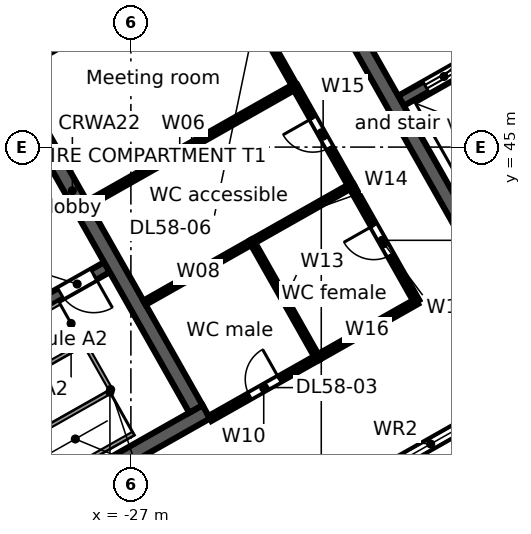
"""IFC4 building model, lengths in metres.
Left out: names, types, materials, properties, quantities, classifications, styles, units other than length and angle.
Written with IfcOpenShell. Run it as: python <this file> out.ifc"""

import sys

from ifc_helpers import new_model, si_unit, direction, frame, frame_2d, origin, place, context, subcontext, project, spatial, rectangle, extrude, element, fill, save


model = new_model("IFC4")
c1 = context("Model", 3, precision=1e-05, world=origin(), true_north=direction((0.0, 1.0)))
c2 = subcontext(c1, "Body", "Model", "MODEL_VIEW")
j1 = project(units=[si_unit("LENGTHUNIT", "METRE"), si_unit("PLANEANGLEUNIT", "RADIAN")], contexts=[c1])
p1 = place(None, origin())
s1 = spatial("IfcSite", under=j1, at=p1, CompositionType="ELEMENT")
p2 = place(p1, origin())
s2 = spatial("IfcBuilding", under=s1, at=p2, CompositionType="ELEMENT")
p3 = place(p2, frame((0.0, 0.0, 266.5)))
s3 = spatial("IfcBuildingStorey", under=s2, at=p3, CompositionType="ELEMENT", Elevation=266.5)
p4 = place(p3, frame((-58.732, 38.771, 0.0), z_axis=(0.0, 0.0, 1.0), x_axis=(0.870355615581, 0.492423702137, 0.0)))
e1 = element("IfcWall", 1, at=p4, inside=s3, PredefinedType="STANDARD", context=c2, shape_type="SweptSolid", body=[
    extrude(rectangle(XDim=64.052, YDim=0.25, at=frame_2d((32.026, 0.0))), origin(), (0.0, 0.0, 1.0), 3.52),
])
p5 = place(p4, frame((61.259, 0.0, 0.8)))
e2 = element("IfcOpeningElement", 2, at=p5, cuts=e1, PredefinedType="OPENING", context=c2, shape_type="SweptSolid", body=[
    extrude(rectangle(XDim=2.4, YDim=2.2, at=frame_2d((1.2, 1.1))), frame((0.0, 0.135, 0.0), z_axis=(0.0, -1.0, 0.0), x_axis=(1.0, 0.0, 0.0)), (0.0, 0.0, 1.0), 0.27),
])
p6 = place(p4, frame((58.216, 0.0, 0.8)))
e3 = element("IfcOpeningElement", 3, at=p6, cuts=e1, PredefinedType="OPENING", context=c2, shape_type="SweptSolid", body=[
    extrude(rectangle(XDim=2.4, YDim=2.2, at=frame_2d((1.2, 1.1))), frame((0.0, 0.135, 0.0), z_axis=(0.0, -1.0, 0.0), x_axis=(1.0, 0.0, 0.0)), (0.0, 0.0, 1.0), 0.27),
])
p7 = place(p4, frame((55.173, 0.0, 0.8)))
e4 = element("IfcOpeningElement", 4, at=p7, cuts=e1, PredefinedType="OPENING", context=c2, shape_type="SweptSolid", body=[
    extrude(rectangle(XDim=2.4, YDim=2.2, at=frame_2d((1.2, 1.1))), frame((0.0, 0.135, 0.0), z_axis=(0.0, -1.0, 0.0), x_axis=(1.0, 0.0, 0.0)), (0.0, 0.0, 1.0), 0.27),
])
p8 = place(p4, frame((52.129, 0.0, 0.8)))
e5 = element("IfcOpeningElement", 5, at=p8, cuts=e1, PredefinedType="OPENING", context=c2, shape_type="SweptSolid", body=[
    extrude(rectangle(XDim=2.4, YDim=2.2, at=frame_2d((1.2, 1.1))), frame((0.0, 0.135, 0.0), z_axis=(0.0, -1.0, 0.0), x_axis=(1.0, 0.0, 0.0)), (0.0, 0.0, 1.0), 0.27),
])
p9 = place(p4, frame((49.086, 0.0, 0.8)))
e6 = element("IfcOpeningElement", 6, at=p9, cuts=e1, PredefinedType="OPENING", context=c2, shape_type="SweptSolid", body=[
    extrude(rectangle(XDim=2.4, YDim=2.2, at=frame_2d((1.2, 1.1))), frame((0.0, 0.135, 0.0), z_axis=(0.0, -1.0, 0.0), x_axis=(1.0, 0.0, 0.0)), (0.0, 0.0, 1.0), 0.27),
])
p10 = place(p4, frame((46.043, 0.0, 0.8)))
e7 = element("IfcOpeningElement", 7, at=p10, cuts=e1, PredefinedType="OPENING", context=c2, shape_type="SweptSolid", body=[
    extrude(rectangle(XDim=2.4, YDim=2.2, at=frame_2d((1.2, 1.1))), frame((0.0, 0.135, 0.0), z_axis=(0.0, -1.0, 0.0), x_axis=(1.0, 0.0, 0.0)), (0.0, 0.0, 1.0), 0.27),
])
p11 = place(p4, frame((43.0, 0.0, 0.8)))
e8 = element("IfcOpeningElement", 8, at=p11, cuts=e1, PredefinedType="OPENING", context=c2, shape_type="SweptSolid", body=[
    extrude(rectangle(XDim=2.4, YDim=2.2, at=frame_2d((1.2, 1.1))), frame((0.0, 0.135, 0.0), z_axis=(0.0, -1.0, 0.0), x_axis=(1.0, 0.0, 0.0)), (0.0, 0.0, 1.0), 0.27),
])
p12 = place(p4, frame((39.956, 0.0, 0.8)))
e9 = element("IfcOpeningElement", 9, at=p12, cuts=e1, PredefinedType="OPENING", context=c2, shape_type="SweptSolid", body=[
    extrude(rectangle(XDim=2.4, YDim=2.2, at=frame_2d((1.2, 1.1))), frame((0.0, 0.135, 0.0), z_axis=(0.0, -1.0, 0.0), x_axis=(1.0, 0.0, 0.0)), (0.0, 0.0, 1.0), 0.27),
])
p13 = place(p4, frame((36.913, 0.0, 0.8)))
e10 = element("IfcOpeningElement", 10, at=p13, cuts=e1, PredefinedType="OPENING", context=c2, shape_type="SweptSolid", body=[
    extrude(rectangle(XDim=2.4, YDim=2.2, at=frame_2d((1.2, 1.1))), frame((0.0, 0.135, 0.0), z_axis=(0.0, -1.0, 0.0), x_axis=(1.0, 0.0, 0.0)), (0.0, 0.0, 1.0), 0.27),
])
p14 = place(p4, frame((33.87, 0.0, 0.8)))
e11 = element("IfcOpeningElement", 11, at=p14, cuts=e1, PredefinedType="OPENING", context=c2, shape_type="SweptSolid", body=[
    extrude(rectangle(XDim=2.4, YDim=2.2, at=frame_2d((1.2, 1.1))), frame((0.0, 0.135, 0.0), z_axis=(0.0, -1.0, 0.0), x_axis=(1.0, 0.0, 0.0)), (0.0, 0.0, 1.0), 0.27),
])
p15 = place(p4, frame((30.826, 0.0, 0.8)))
e12 = element("IfcOpeningElement", 12, at=p15, cuts=e1, PredefinedType="OPENING", context=c2, shape_type="SweptSolid", body=[
    extrude(rectangle(XDim=2.4, YDim=2.2, at=frame_2d((1.2, 1.1))), frame((0.0, 0.135, 0.0), z_axis=(0.0, -1.0, 0.0), x_axis=(1.0, 0.0, 0.0)), (0.0, 0.0, 1.0), 0.27),
])
p16 = place(p4, frame((27.783, 0.0, 0.8)))
e13 = element("IfcOpeningElement", 13, at=p16, cuts=e1, PredefinedType="OPENING", context=c2, shape_type="SweptSolid", body=[
    extrude(rectangle(XDim=2.4, YDim=2.2, at=frame_2d((1.2, 1.1))), frame((0.0, 0.135, 0.0), z_axis=(0.0, -1.0, 0.0), x_axis=(1.0, 0.0, 0.0)), (0.0, 0.0, 1.0), 0.27),
])
p17 = place(p4, frame((24.74, 0.0, 0.8)))
e14 = element("IfcOpeningElement", 14, at=p17, cuts=e1, PredefinedType="OPENING", context=c2, shape_type="SweptSolid", body=[
    extrude(rectangle(XDim=2.4, YDim=2.2, at=frame_2d((1.2, 1.1))), frame((0.0, 0.135, 0.0), z_axis=(0.0, -1.0, 0.0), x_axis=(1.0, 0.0, 0.0)), (0.0, 0.0, 1.0), 0.27),
])
p18 = place(p4, frame((21.696, 0.0, 0.8)))
e15 = element("IfcOpeningElement", 15, at=p18, cuts=e1, PredefinedType="OPENING", context=c2, shape_type="SweptSolid", body=[
    extrude(rectangle(XDim=2.4, YDim=2.2, at=frame_2d((1.2, 1.1))), frame((0.0, 0.135, 0.0), z_axis=(0.0, -1.0, 0.0), x_axis=(1.0, 0.0, 0.0)), (0.0, 0.0, 1.0), 0.27),
])
p19 = place(p4, frame((18.653, 0.0, 0.8)))
e16 = element("IfcOpeningElement", 16, at=p19, cuts=e1, PredefinedType="OPENING", context=c2, shape_type="SweptSolid", body=[
    extrude(rectangle(XDim=2.4, YDim=2.2, at=frame_2d((1.2, 1.1))), frame((0.0, 0.135, 0.0), z_axis=(0.0, -1.0, 0.0), x_axis=(1.0, 0.0, 0.0)), (0.0, 0.0, 1.0), 0.27),
])
p20 = place(p4, frame((15.61, 0.0, 0.8)))
e17 = element("IfcOpeningElement", 17, at=p20, cuts=e1, PredefinedType="OPENING", context=c2, shape_type="SweptSolid", body=[
    extrude(rectangle(XDim=2.4, YDim=2.2, at=frame_2d((1.2, 1.1))), frame((0.0, 0.135, 0.0), z_axis=(0.0, -1.0, 0.0), x_axis=(1.0, 0.0, 0.0)), (0.0, 0.0, 1.0), 0.27),
])
p21 = place(p4, frame((12.567, 0.0, 0.8)))
e18 = element("IfcOpeningElement", 18, at=p21, cuts=e1, PredefinedType="OPENING", context=c2, shape_type="SweptSolid", body=[
    extrude(rectangle(XDim=2.4, YDim=2.2, at=frame_2d((1.2, 1.1))), frame((0.0, 0.135, 0.0), z_axis=(0.0, -1.0, 0.0), x_axis=(1.0, 0.0, 0.0)), (0.0, 0.0, 1.0), 0.27),
])
p22 = place(p4, frame((9.523, 0.0, 0.8)))
e19 = element("IfcOpeningElement", 19, at=p22, cuts=e1, PredefinedType="OPENING", context=c2, shape_type="SweptSolid", body=[
    extrude(rectangle(XDim=2.4, YDim=2.2, at=frame_2d((1.2, 1.1))), frame((0.0, 0.135, 0.0), z_axis=(0.0, -1.0, 0.0), x_axis=(1.0, 0.0, 0.0)), (0.0, 0.0, 1.0), 0.27),
])
p23 = place(p4, frame((6.48, 0.0, 0.8)))
e20 = element("IfcOpeningElement", 20, at=p23, cuts=e1, PredefinedType="OPENING", context=c2, shape_type="SweptSolid", body=[
    extrude(rectangle(XDim=2.4, YDim=2.2, at=frame_2d((1.2, 1.1))), frame((0.0, 0.135, 0.0), z_axis=(0.0, -1.0, 0.0), x_axis=(1.0, 0.0, 0.0)), (0.0, 0.0, 1.0), 0.27),
])
p24 = place(p4, frame((3.437, 0.0, 0.8)))
e21 = element("IfcOpeningElement", 21, at=p24, cuts=e1, PredefinedType="OPENING", context=c2, shape_type="SweptSolid", body=[
    extrude(rectangle(XDim=2.4, YDim=2.2, at=frame_2d((1.2, 1.1))), frame((0.0, 0.135, 0.0), z_axis=(0.0, -1.0, 0.0), x_axis=(1.0, 0.0, 0.0)), (0.0, 0.0, 1.0), 0.27),
])
p25 = place(p4, frame((0.393, 0.0, 0.8)))
e22 = element("IfcOpeningElement", 22, at=p25, cuts=e1, PredefinedType="OPENING", context=c2, shape_type="SweptSolid", body=[
    extrude(rectangle(XDim=2.4, YDim=2.2, at=frame_2d((1.2, 1.1))), frame((0.0, 0.135, 0.0), z_axis=(0.0, -1.0, 0.0), x_axis=(1.0, 0.0, 0.0)), (0.0, 0.0, 1.0), 0.27),
])
p26 = place(p3, frame((-3.017, 46.293, 0.0), z_axis=(0.0, 0.0, 1.0), x_axis=(-0.870355474887, -0.492423950812, 0.0)))
e23 = element("IfcWall", 23, at=p26, inside=s3, PredefinedType="STANDARD", context=c2, shape_type="SweptSolid", body=[
    extrude(rectangle(XDim=40.34, YDim=0.25, at=frame_2d((20.17, 0.0))), origin(), (0.0, 0.0, 1.0), 3.52),
])
p27 = place(p26, frame((37.428, 0.0, 0.8)))
e24 = element("IfcOpeningElement", 24, at=p27, cuts=e23, PredefinedType="OPENING", context=c2, shape_type="SweptSolid", body=[
    extrude(rectangle(XDim=2.4, YDim=2.2, at=frame_2d((1.2, 1.1))), frame((0.0, 0.135, 0.0), z_axis=(0.0, -1.0, 0.0), x_axis=(1.0, 0.0, 0.0)), (0.0, 0.0, 1.0), 0.27),
])
p28 = place(p26, frame((34.372, 0.0, 0.0)))
e25 = element("IfcOpeningElement", 25, at=p28, cuts=e23, PredefinedType="OPENING", context=c2, shape_type="SweptSolid", body=[
    extrude(rectangle(XDim=1.8, YDim=2.4, at=frame_2d((0.9, 1.2))), frame((0.0, 0.135, 0.0), z_axis=(0.0, -1.0, 0.0), x_axis=(1.0, 0.0, 0.0)), (0.0, 0.0, 1.0), 0.27),
])
p29 = place(p26, frame((30.716, 0.0, 0.8)))
e26 = element("IfcOpeningElement", 26, at=p29, cuts=e23, PredefinedType="OPENING", context=c2, shape_type="SweptSolid", body=[
    extrude(rectangle(XDim=2.4, YDim=2.2, at=frame_2d((1.2, 1.1))), frame((0.0, 0.135, 0.0), z_axis=(0.0, -1.0, 0.0), x_axis=(1.0, 0.0, 0.0)), (0.0, 0.0, 1.0), 0.27),
])
p30 = place(p26, frame((27.36, 0.0, 0.8)))
e27 = element("IfcOpeningElement", 27, at=p30, cuts=e23, PredefinedType="OPENING", context=c2, shape_type="SweptSolid", body=[
    extrude(rectangle(XDim=2.4, YDim=2.2, at=frame_2d((1.2, 1.1))), frame((0.0, 0.135, 0.0), z_axis=(0.0, -1.0, 0.0), x_axis=(1.0, 0.0, 0.0)), (0.0, 0.0, 1.0), 0.27),
])
p31 = place(p26, frame((24.304, 0.0, 0.0)))
e28 = element("IfcOpeningElement", 28, at=p31, cuts=e23, PredefinedType="OPENING", context=c2, shape_type="SweptSolid", body=[
    extrude(rectangle(XDim=1.8, YDim=2.4, at=frame_2d((0.9, 1.2))), frame((0.0, 0.135, 0.0), z_axis=(0.0, -1.0, 0.0), x_axis=(1.0, 0.0, 0.0)), (0.0, 0.0, 1.0), 0.27),
])
p32 = place(p26, frame((20.648, 0.0, 0.8)))
e29 = element("IfcOpeningElement", 29, at=p32, cuts=e23, PredefinedType="OPENING", context=c2, shape_type="SweptSolid", body=[
    extrude(rectangle(XDim=2.4, YDim=2.2, at=frame_2d((1.2, 1.1))), frame((0.0, 0.135, 0.0), z_axis=(0.0, -1.0, 0.0), x_axis=(1.0, 0.0, 0.0)), (0.0, 0.0, 1.0), 0.27),
])
p33 = place(p26, frame((17.292, 0.0, 0.8)))
e30 = element("IfcOpeningElement", 30, at=p33, cuts=e23, PredefinedType="OPENING", context=c2, shape_type="SweptSolid", body=[
    extrude(rectangle(XDim=2.4, YDim=2.2, at=frame_2d((1.2, 1.1))), frame((0.0, 0.135, 0.0), z_axis=(0.0, -1.0, 0.0), x_axis=(1.0, 0.0, 0.0)), (0.0, 0.0, 1.0), 0.27),
])
p34 = place(p26, frame((14.236, 0.0, 0.0)))
e31 = element("IfcOpeningElement", 31, at=p34, cuts=e23, PredefinedType="OPENING", context=c2, shape_type="SweptSolid", body=[
    extrude(rectangle(XDim=1.8, YDim=2.4, at=frame_2d((0.9, 1.2))), frame((0.0, 0.135, 0.0), z_axis=(0.0, -1.0, 0.0), x_axis=(1.0, 0.0, 0.0)), (0.0, 0.0, 1.0), 0.27),
])
p35 = place(p26, frame((10.58, 0.0, 0.8)))
e32 = element("IfcOpeningElement", 32, at=p35, cuts=e23, PredefinedType="OPENING", context=c2, shape_type="SweptSolid", body=[
    extrude(rectangle(XDim=2.4, YDim=2.2, at=frame_2d((1.2, 1.1))), frame((0.0, 0.135, 0.0), z_axis=(0.0, -1.0, 0.0), x_axis=(1.0, 0.0, 0.0)), (0.0, 0.0, 1.0), 0.27),
])
p36 = place(p26, frame((7.224, 0.0, 0.8)))
e33 = element("IfcOpeningElement", 33, at=p36, cuts=e23, PredefinedType="OPENING", context=c2, shape_type="SweptSolid", body=[
    extrude(rectangle(XDim=2.4, YDim=2.2, at=frame_2d((1.2, 1.1))), frame((0.0, 0.135, 0.0), z_axis=(0.0, -1.0, 0.0), x_axis=(1.0, 0.0, 0.0)), (0.0, 0.0, 1.0), 0.27),
])
p37 = place(p26, frame((4.168, 0.0, 0.0)))
e34 = element("IfcOpeningElement", 34, at=p37, cuts=e23, PredefinedType="OPENING", context=c2, shape_type="SweptSolid", body=[
    extrude(rectangle(XDim=1.8, YDim=2.4, at=frame_2d((0.9, 1.2))), frame((0.0, 0.135, 0.0), z_axis=(0.0, -1.0, 0.0), x_axis=(1.0, 0.0, 0.0)), (0.0, 0.0, 1.0), 0.27),
])
p38 = place(p26, frame((0.512, 0.0, 0.8)))
e35 = element("IfcOpeningElement", 35, at=p38, cuts=e23, PredefinedType="OPENING", context=c2, shape_type="SweptSolid", body=[
    extrude(rectangle(XDim=2.4, YDim=2.2, at=frame_2d((1.2, 1.1))), frame((0.0, 0.135, 0.0), z_axis=(0.0, -1.0, 0.0), x_axis=(1.0, 0.0, 0.0)), (0.0, 0.0, 1.0), 0.27),
])
p39 = place(p3, frame((-39.813, 29.662, 0.0), z_axis=(0.0, 0.0, 1.0), x_axis=(0.870350116061, 0.492433422375, 0.0)))
e36 = element("IfcWall", 36, at=p39, inside=s3, PredefinedType="SOLIDWALL", context=c2, shape_type="SweptSolid", body=[
    extrude(rectangle(XDim=17.0, YDim=0.4, at=frame_2d((8.5, 0.0))), origin(), (0.0, 0.0, 1.0), 3.52),
])
p40 = place(p39, frame((7.2, 0.0, 0.0)))
e37 = element("IfcOpeningElement", 37, at=p40, cuts=e36, PredefinedType="OPENING", context=c2, shape_type="SweptSolid", body=[
    extrude(rectangle(XDim=1.2, YDim=2.1, at=frame_2d((0.6, 1.05))), frame((0.0, 0.21, 0.0), z_axis=(0.0, -1.0, 0.0), x_axis=(1.0, 0.0, 0.0)), (0.0, 0.0, 1.0), 0.42),
])
p41 = place(p3, frame((-34.245, 38.097, 0.0), z_axis=(0.0, 0.0, 1.0), x_axis=(0.870356351998, 0.492422400523, 0.0)))
e38 = element("IfcWall", 38, at=p41, inside=s3, PredefinedType="SOLIDWALL", context=c2, shape_type="SweptSolid", body=[
    extrude(rectangle(XDim=7.6, YDim=0.3, at=frame_2d((3.8, 0.0))), origin(), (0.0, 0.0, 1.0), 3.52),
])
p42 = place(p41, frame((6.2, 0.0, 0.0)))
e39 = element("IfcOpeningElement", 39, at=p42, cuts=e38, PredefinedType="OPENING", context=c2, shape_type="SweptSolid", body=[
    extrude(rectangle(XDim=1.0, YDim=2.1, at=frame_2d((0.5, 1.05))), frame((0.0, 0.16, 0.0), z_axis=(0.0, -1.0, 0.0), x_axis=(1.0, 0.0, 0.0)), (0.0, 0.0, 1.0), 0.32),
])
p43 = place(p3, frame((-31.79, 49.597, 0.0), z_axis=(0.0, 0.0, 1.0), x_axis=(0.492421663121, -0.870356769198, 0.0)))
e40 = element("IfcWall", 40, at=p43, inside=s3, PredefinedType="SOLIDWALL", context=c2, shape_type="SweptSolid", body=[
    extrude(rectangle(XDim=13.2, YDim=0.4, at=frame_2d((6.6, 0.0))), origin(), (0.0, 0.0, 1.0), 3.52),
])
p44 = place(p3, frame((-19.892, 46.218, 0.0), z_axis=(0.0, 0.0, 1.0), x_axis=(0.870341639186, 0.492448404505, 0.0)))
e41 = element("IfcWall", 41, at=p44, inside=s3, PredefinedType="SOLIDWALL", context=c2, shape_type="SweptSolid", body=[
    extrude(rectangle(XDim=5.1, YDim=0.3, at=frame_2d((2.55, 0.0))), origin(), (0.0, 0.0, 1.0), 3.52),
])
p45 = place(p44, frame((0.75, 0.0, 0.0)))
e42 = element("IfcOpeningElement", 42, at=p45, cuts=e41, PredefinedType="OPENING", context=c2, shape_type="SweptSolid", body=[
    extrude(rectangle(XDim=1.1, YDim=2.1, at=frame_2d((0.55, 1.05))), frame((0.0, 0.16, 0.0), z_axis=(0.0, -1.0, 0.0), x_axis=(1.0, 0.0, 0.0)), (0.0, 0.0, 1.0), 0.32),
])
p46 = place(p44, frame((3.35, 0.0, 0.0)))
e43 = element("IfcOpeningElement", 43, at=p46, cuts=e41, PredefinedType="OPENING", context=c2, shape_type="SweptSolid", body=[
    extrude(rectangle(XDim=1.1, YDim=2.1, at=frame_2d((0.55, 1.05))), frame((0.0, 0.16, 0.0), z_axis=(0.0, -1.0, 0.0), x_axis=(1.0, 0.0, 0.0)), (0.0, 0.0, 1.0), 0.32),
])
p47 = place(p3, frame((-24.4, 53.779, 0.0), z_axis=(0.0, 0.0, 1.0), x_axis=(0.492421663121, -0.870356769198, 0.0)))
e44 = element("IfcWall", 44, at=p47, inside=s3, PredefinedType="SOLIDWALL", context=c2, shape_type="SweptSolid", body=[
    extrude(rectangle(XDim=13.2, YDim=0.4, at=frame_2d((6.6, 0.0))), origin(), (0.0, 0.0, 1.0), 3.52),
])
p48 = place(p3, frame((-30.089, 46.998, 0.0), z_axis=(0.0, 0.0, 1.0), x_axis=(0.870424575418, 0.492301796167, 0.0)))
e45 = element("IfcWall", 45, at=p48, inside=s3, PredefinedType="PARTITIONING", context=c2, shape_type="SweptSolid", body=[
    extrude(rectangle(XDim=6.25, YDim=0.125, at=frame_2d((3.125, 0.0))), origin(), (0.0, 0.0, 1.0), 3.52),
])
p49 = place(p3, frame((-28.119, 43.516, 0.0), z_axis=(0.0, 0.0, 1.0), x_axis=(0.870310250913, 0.49250387527, 0.0)))
e46 = element("IfcWall", 46, at=p49, inside=s3, PredefinedType="PARTITIONING", context=c2, shape_type="SweptSolid", body=[
    extrude(rectangle(XDim=6.25, YDim=0.15, at=frame_2d((3.125, 0.0))), origin(), (0.0, 0.0, 1.0), 2.792),
])
p50 = place(p3, frame((-26.642, 40.905, 0.0), z_axis=(0.0, 0.0, 1.0), x_axis=(0.870296945076, 0.492527387453, 0.0)))
e47 = element("IfcWall", 47, at=p50, inside=s3, PredefinedType="PARTITIONING", context=c2, shape_type="SweptSolid", body=[
    extrude(rectangle(XDim=3.251, YDim=0.125, at=frame_2d((1.625, 0.0))), origin(), (0.0, 0.0, 1.0), 2.792),
])
p51 = place(p3, frame((-24.919, 37.859, 0.0), z_axis=(0.0, 0.0, 1.0), x_axis=(0.870407498556, 0.49233198805, 0.0)))
e48 = element("IfcWall", 48, at=p51, inside=s3, PredefinedType="PARTITIONING", context=c2, shape_type="SweptSolid", body=[
    extrude(rectangle(XDim=3.25, YDim=0.15, at=frame_2d((1.625, 0.0))), origin(), (0.0, 0.0, 1.0), 2.792),
])
p52 = place(p51, frame((1.2, 0.0, 0.0)))
e49 = element("IfcOpeningElement", 49, at=p52, cuts=e48, PredefinedType="OPENING", context=c2, shape_type="SweptSolid", body=[
    extrude(rectangle(XDim=0.9, YDim=2.1, at=frame_2d((0.45, 1.05))), frame((0.0, 0.085, 0.0), z_axis=(0.0, -1.0, 0.0), x_axis=(1.0, 0.0, 0.0)), (0.0, 0.0, 1.0), 0.17),
])
p53 = place(p3, frame((-24.649, 50.075, 0.0), z_axis=(0.0, 0.0, 1.0), x_axis=(0.492340861121, -0.870402479587, 0.0)))
e50 = element("IfcWall", 50, at=p53, inside=s3, PredefinedType="PARTITIONING", context=c2, shape_type="SweptSolid", body=[
    extrude(rectangle(XDim=3.999, YDim=0.125, at=frame_2d((2.0, 0.0))), origin(), (0.0, 0.0, 1.0), 2.792),
])
p54 = place(p53, frame((1.45, 0.0, 0.0)))
e51 = element("IfcOpeningElement", 51, at=p54, cuts=e50, PredefinedType="OPENING", context=c2, shape_type="SweptSolid", body=[
    extrude(rectangle(XDim=0.9, YDim=2.1, at=frame_2d((0.45, 1.05))), frame((0.0, 0.073, 0.0), z_axis=(0.0, -1.0, 0.0), x_axis=(1.0, 0.0, 0.0)), (0.0, 0.0, 1.0), 0.145),
])
p55 = place(p3, frame((-23.813, 42.506, 0.0), z_axis=(0.0, 0.0, 1.0), x_axis=(0.492190545807, -0.870487487916, 0.0)))
e52 = element("IfcWall", 52, at=p55, inside=s3, PredefinedType="PARTITIONING", context=c2, shape_type="SweptSolid", body=[
    extrude(rectangle(XDim=3.5, YDim=0.125, at=frame_2d((1.75, 0.0))), origin(), (0.0, 0.0, 1.0), 3.52),
])
p56 = place(p3, frame((-23.813, 42.506, 0.0), z_axis=(0.0, 0.0, 1.0), x_axis=(0.870423351516, 0.492303960105, 0.0)))
e53 = element("IfcWall", 53, at=p56, inside=s3, PredefinedType="PARTITIONING", context=c2, shape_type="SweptSolid", body=[
    extrude(rectangle(XDim=3.0, YDim=0.125, at=frame_2d((1.5, 0.0))), origin(), (0.0, 0.0, 1.0), 3.52),
])
p57 = place(p3, frame((-22.68, 46.594, 0.0), z_axis=(0.0, 0.0, 1.0), x_axis=(0.492612172641, -0.870248957119, 0.0)))
e54 = element("IfcWall", 54, at=p57, inside=s3, PredefinedType="PARTITIONING", context=c2, shape_type="SweptSolid", body=[
    extrude(rectangle(XDim=3.0, YDim=0.15, at=frame_2d((1.5, 0.0))), origin(), (0.0, 0.0, 1.0), 3.52),
])
p58 = place(p57, frame((0.95, 0.0, 0.0)))
e55 = element("IfcOpeningElement", 55, at=p58, cuts=e54, PredefinedType="OPENING", context=c2, shape_type="SweptSolid", body=[
    extrude(rectangle(XDim=0.9, YDim=2.1, at=frame_2d((0.45, 1.05))), frame((0.0, 0.085, 0.0), z_axis=(0.0, -1.0, 0.0), x_axis=(1.0, 0.0, 0.0)), (0.0, 0.0, 1.0), 0.17),
])
p59 = place(p3, frame((-22.09, 39.459, 0.0), z_axis=(0.0, 0.0, 1.0), x_axis=(0.870248957119, 0.492612172641, 0.0)))
e56 = element("IfcWall", 56, at=p59, inside=s3, PredefinedType="PARTITIONING", context=c2, shape_type="SweptSolid", body=[
    extrude(rectangle(XDim=3.0, YDim=0.15, at=frame_2d((1.5, 0.0))), origin(), (0.0, 0.0, 1.0), 3.52),
])
p60 = place(p3, frame((-21.202, 43.983, 0.0), z_axis=(0.0, 0.0, 1.0), x_axis=(0.492339993675, -0.870402970255, 0.0)))
e57 = element("IfcWall", 57, at=p60, inside=s3, PredefinedType="PARTITIONING", context=c2, shape_type="SweptSolid", body=[
    extrude(rectangle(XDim=3.5, YDim=0.15, at=frame_2d((1.75, 0.0))), origin(), (0.0, 0.0, 1.0), 3.52),
])
p61 = place(p60, frame((1.2, 0.0, 0.0)))
e58 = element("IfcOpeningElement", 58, at=p61, cuts=e57, PredefinedType="OPENING", context=c2, shape_type="SweptSolid", body=[
    extrude(rectangle(XDim=0.9, YDim=2.1, at=frame_2d((0.45, 1.05))), frame((0.0, 0.085, 0.0), z_axis=(0.0, -1.0, 0.0), x_axis=(1.0, 0.0, 0.0)), (0.0, 0.0, 1.0), 0.17),
])
p62 = place(p33, origin())
e59 = element("IfcWindow", 59, at=p62, inside=s3, PartitioningType="SINGLE_PANEL", PredefinedType="WINDOW", context=c2, shape_type="SweptSolid", body=[
    extrude(rectangle(XDim=2.4, YDim=2.2, at=frame_2d((1.2, 1.1))), frame((0.0, 0.03, 0.0), z_axis=(0.0, -1.0, 0.0), x_axis=(1.0, 0.0, 0.0)), (0.0, 0.0, 1.0), 0.06),
])
fill(e30, e59)
p63 = place(p42, frame((1.0, 0.0, 0.0), z_axis=(0.0, 0.0, 1.0), x_axis=(-1.0, 0.0, 0.0)))
e60 = element("IfcDoor", 60, at=p63, inside=s3, OperationType="SINGLE_SWING_LEFT", PredefinedType="DOOR", context=c2, shape_type="SweptSolid", body=[
    extrude(rectangle(XDim=1.0, YDim=2.1, at=frame_2d((0.5, 1.05))), frame((0.0, 0.025, 0.0), z_axis=(0.0, -1.0, 0.0), x_axis=(1.0, 0.0, 0.0)), (0.0, 0.0, 1.0), 0.05),
])
fill(e39, e60)
p64 = place(p45, origin())
e61 = element("IfcDoor", 61, at=p64, inside=s3, OperationType="DOUBLE_DOOR_SLIDING", PredefinedType="DOOR", context=c2, shape_type="SweptSolid", body=[
    extrude(rectangle(XDim=1.1, YDim=2.1, at=frame_2d((0.55, 1.05))), frame((0.0, 0.025, 0.0), z_axis=(0.0, -1.0, 0.0), x_axis=(1.0, 0.0, 0.0)), (0.0, 0.0, 1.0), 0.05),
])
fill(e42, e61)
p65 = place(p52, origin())
e62 = element("IfcDoor", 62, at=p65, inside=s3, OperationType="SINGLE_SWING_RIGHT", PredefinedType="DOOR", context=c2, shape_type="SweptSolid", body=[
    extrude(rectangle(XDim=0.9, YDim=2.1, at=frame_2d((0.45, 1.05))), frame((0.0, 0.025, 0.0), z_axis=(0.0, -1.0, 0.0), x_axis=(1.0, 0.0, 0.0)), (0.0, 0.0, 1.0), 0.05),
])
fill(e49, e62)
p66 = place(p61, frame((0.9, 0.0, 0.0), z_axis=(0.0, 0.0, 1.0), x_axis=(-1.0, 0.0, 0.0)))
e63 = element("IfcDoor", 63, at=p66, inside=s3, OperationType="SINGLE_SWING_RIGHT", PredefinedType="DOOR", context=c2, shape_type="SweptSolid", body=[
    extrude(rectangle(XDim=0.9, YDim=2.1, at=frame_2d((0.45, 1.05))), frame((0.0, 0.025, 0.0), z_axis=(0.0, -1.0, 0.0), x_axis=(1.0, 0.0, 0.0)), (0.0, 0.0, 1.0), 0.05),
])
fill(e58, e63)
p67 = place(p58, frame((0.9, 0.0, 0.0), z_axis=(0.0, 0.0, 1.0), x_axis=(-1.0, 0.0, 0.0)))
e64 = element("IfcDoor", 64, at=p67, inside=s3, OperationType="SINGLE_SWING_RIGHT", PredefinedType="DOOR", context=c2, shape_type="SweptSolid", body=[
    extrude(rectangle(XDim=0.9, YDim=2.1, at=frame_2d((0.45, 1.05))), frame((0.0, 0.025, 0.0), z_axis=(0.0, -1.0, 0.0), x_axis=(1.0, 0.0, 0.0)), (0.0, 0.0, 1.0), 0.05),
])
fill(e55, e64)
save(model, sys.argv[1])
